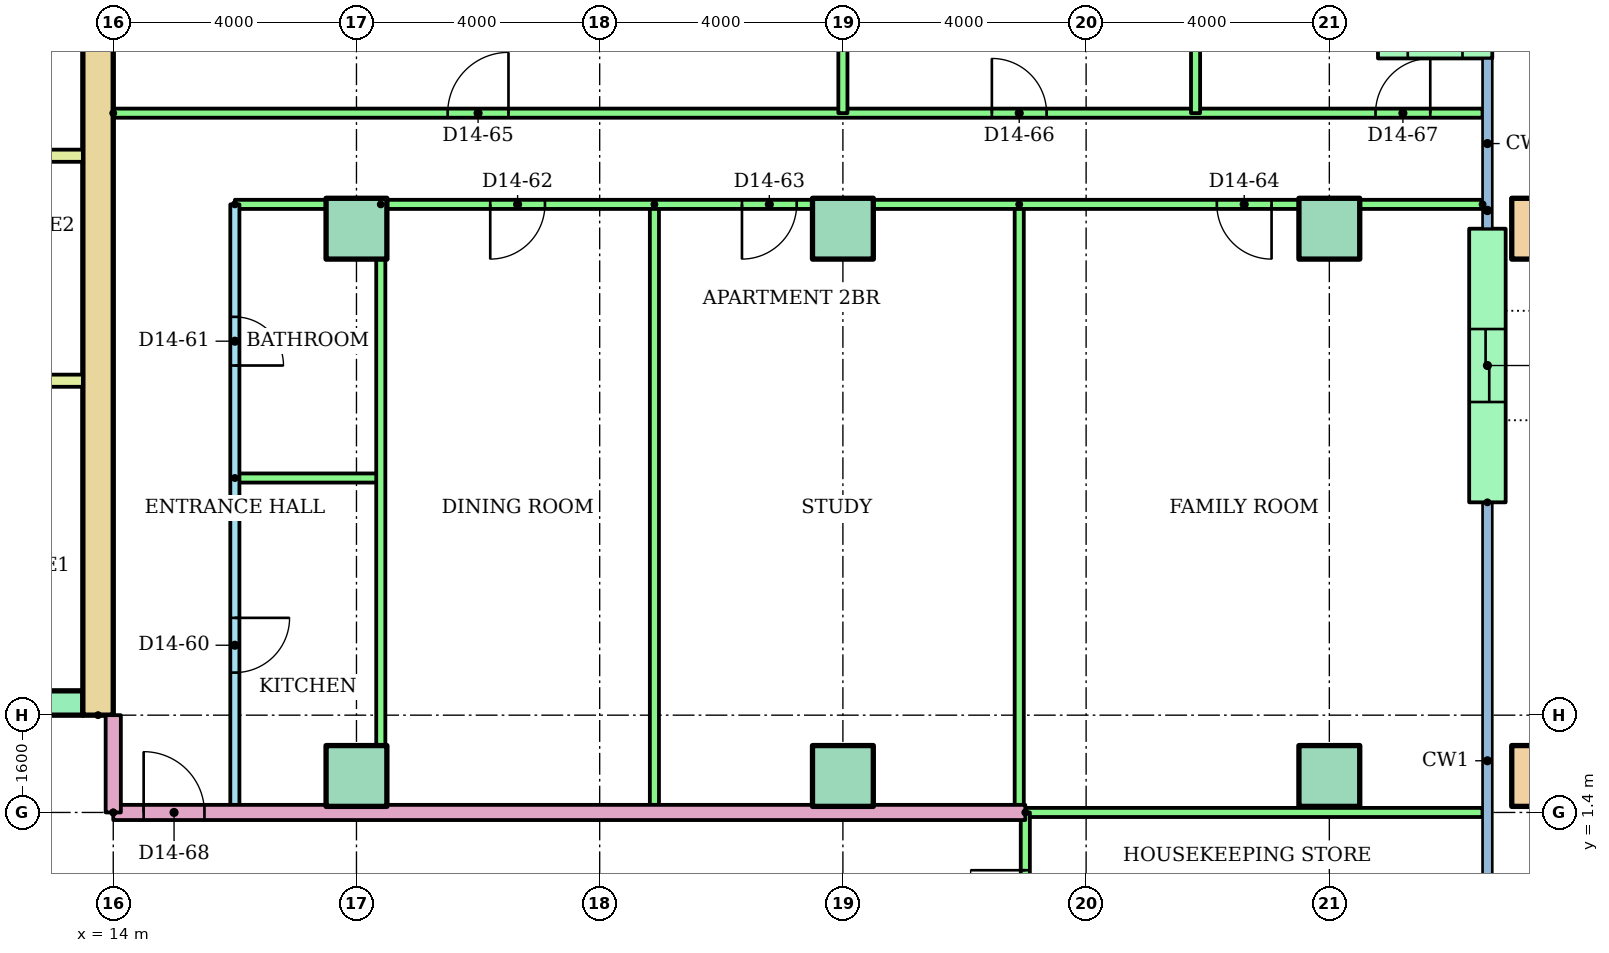
"""IFC4 building model, lengths in metres.
Left out: names, types, materials, properties, quantities, classifications, styles, units other than length and angle.
Written with IfcOpenShell. Run it as: python <this file> out.ifc"""

import sys

from ifc_helpers import new_model, si_unit, direction, frame, frame_2d, origin, origin_2d, place, context, subcontext, project, spatial, rectangle, hollow_rectangle, extrude, element, fill, save


model = new_model("IFC4")
c1 = context("Model", 3, precision=1e-05, world=origin(), true_north=direction((0.0, 1.0)))
c2 = subcontext(c1, "Body", "Model", "MODEL_VIEW")
j1 = project(units=[si_unit("LENGTHUNIT", "METRE"), si_unit("PLANEANGLEUNIT", "RADIAN")], contexts=[c1])
p1 = place(None, origin())
s1 = spatial("IfcSite", under=j1, at=p1, CompositionType="ELEMENT")
p2 = place(p1, origin())
s2 = spatial("IfcBuilding", under=s1, at=p2, CompositionType="ELEMENT")
p3 = place(p2, frame((0.0, 0.0, 54.4)))
s3 = spatial("IfcBuildingStorey", under=s2, at=p3, CompositionType="ELEMENT", Elevation=54.4)
for number, where in (
    (1, (18.0, 2.0, 0.0)),
    (2, (26.0, 2.0, 0.0)),
    (3, (34.0, 2.0, 0.0)),
):
    element("IfcColumn", number, at=place(p3, frame(where)), inside=s3, PredefinedType="COLUMN", context=c2, shape_type="SweptSolid", body=[
        extrude(rectangle(XDim=1.0, YDim=1.0, at=origin_2d()), origin(), (0.0, 0.0, 1.0), 3.2),
    ])
p4 = place(p3, frame((37.5, 2.0, 0.0)))
e4 = element("IfcColumn", 4, at=p4, inside=s3, PredefinedType="COLUMN", context=c2, shape_type="SweptSolid", body=[
    extrude(hollow_rectangle(XDim=1.0, YDim=1.0, WallThickness=0.05, at=origin_2d()), origin(), (0.0, 0.0, 1.0), 3.2),
])
for number, where in (
    (5, (18.0, 11.0, 0.0)),
    (6, (26.0, 11.0, 0.0)),
    (7, (34.0, 11.0, 0.0)),
):
    element("IfcColumn", number, at=place(p3, frame(where)), inside=s3, PredefinedType="COLUMN", context=c2, shape_type="SweptSolid", body=[
        extrude(rectangle(XDim=1.0, YDim=1.0, at=origin_2d()), origin(), (0.0, 0.0, 1.0), 3.2),
    ])
p5 = place(p3, frame((37.5, 11.0, 0.0)))
e8 = element("IfcColumn", 8, at=p5, inside=s3, PredefinedType="COLUMN", context=c2, shape_type="SweptSolid", body=[
    extrude(hollow_rectangle(XDim=1.0, YDim=1.0, WallThickness=0.05, at=origin_2d()), origin(), (0.0, 0.0, 1.0), 3.2),
])
p6 = place(p3, frame((36.68, 14.1, 0.0), z_axis=(0.0, 0.0, 1.0), x_axis=(-1.0, 0.0, 0.0)))
e9 = element("IfcWall", 9, at=p6, inside=s3, PredefinedType="STANDARD", context=c2, shape_type="SweptSolid", body=[
    extrude(rectangle(XDim=1.88, YDim=0.6, at=frame_2d((0.94, 0.0))), origin(), (0.0, 0.0, 1.0), 2.92),
])
p7 = place(p6, frame((0.49, 0.0, 0.9)))
e10 = element("IfcOpeningElement", 10, at=p7, cuts=e9, PredefinedType="OPENING", context=c2, shape_type="SweptSolid", body=[
    extrude(rectangle(XDim=0.9, YDim=1.5, at=frame_2d((0.45, 0.75))), frame((0.0, 0.31, 0.0), z_axis=(0.0, -1.0, 0.0), x_axis=(1.0, 0.0, 0.0)), (0.0, 0.0, 1.0), 0.62),
])
p8 = place(p3, frame((36.6, 6.5, 0.0), z_axis=(0.0, 0.0, 1.0), x_axis=(0.0, 1.0, 0.0)))
e11 = element("IfcWall", 11, at=p8, inside=s3, PredefinedType="STANDARD", context=c2, shape_type="SweptSolid", body=[
    extrude(rectangle(XDim=4.5, YDim=0.6, at=frame_2d((2.25, 0.0))), origin(), (0.0, 0.0, 1.0), 2.92),
])
p9 = place(p8, frame((1.65, 0.0, 0.0)))
e12 = element("IfcOpeningElement", 12, at=p9, cuts=e11, PredefinedType="OPENING", context=c2, shape_type="SweptSolid", body=[
    extrude(rectangle(XDim=1.2, YDim=2.1, at=frame_2d((0.6, 1.05))), frame((0.0, 0.31, 0.0), z_axis=(0.0, -1.0, 0.0), x_axis=(1.0, 0.0, 0.0)), (0.0, 0.0, 1.0), 0.62),
])
p10 = place(p3, frame((13.75, 3.0, 0.0), z_axis=(0.0, 0.0, 1.0), x_axis=(0.0, 1.0, 0.0)))
e13 = element("IfcWall", 13, at=p10, inside=s3, PredefinedType="SHEAR", context=c2, shape_type="SweptSolid", body=[
    extrude(rectangle(XDim=17.0, YDim=0.5, at=frame_2d((8.5, 0.0))), origin(), (0.0, 0.0, 1.0), 2.92),
])
p11 = place(p3, frame((-13.5, 3.2, 0.0)))
e14 = element("IfcWall", 14, at=p11, inside=s3, PredefinedType="SHEAR", context=c2, shape_type="SweptSolid", body=[
    extrude(rectangle(XDim=27.0, YDim=0.4, at=frame_2d((13.5, 0.0))), origin(), (0.0, 0.0, 1.0), 2.92),
])
p12 = place(p11, frame((6.861, 0.0, 0.0)))
e15 = element("IfcOpeningElement", 15, at=p12, cuts=e14, PredefinedType="OPENING", context=c2, shape_type="SweptSolid", body=[
    extrude(rectangle(XDim=1.1, YDim=2.1, at=frame_2d((0.55, 1.05))), frame((0.0, 0.21, 0.0), z_axis=(0.0, -1.0, 0.0), x_axis=(1.0, 0.0, 0.0)), (0.0, 0.0, 1.0), 0.42),
])
p13 = place(p11, frame((9.906, 0.0, 0.0)))
e16 = element("IfcOpeningElement", 16, at=p13, cuts=e14, PredefinedType="OPENING", context=c2, shape_type="SweptSolid", body=[
    extrude(rectangle(XDim=1.1, YDim=2.1, at=frame_2d((0.55, 1.05))), frame((0.0, 0.21, 0.0), z_axis=(0.0, -1.0, 0.0), x_axis=(1.0, 0.0, 0.0)), (0.0, 0.0, 1.0), 0.42),
])
p14 = place(p11, frame((15.994, 0.0, 0.0)))
e17 = element("IfcOpeningElement", 17, at=p14, cuts=e14, PredefinedType="OPENING", context=c2, shape_type="SweptSolid", body=[
    extrude(rectangle(XDim=1.1, YDim=2.1, at=frame_2d((0.55, 1.05))), frame((0.0, 0.21, 0.0), z_axis=(0.0, -1.0, 0.0), x_axis=(1.0, 0.0, 0.0)), (0.0, 0.0, 1.0), 0.42),
])
p15 = place(p11, frame((19.039, 0.0, 0.0)))
e18 = element("IfcOpeningElement", 18, at=p15, cuts=e14, PredefinedType="OPENING", context=c2, shape_type="SweptSolid", body=[
    extrude(rectangle(XDim=1.1, YDim=2.1, at=frame_2d((0.55, 1.05))), frame((0.0, 0.21, 0.0), z_axis=(0.0, -1.0, 0.0), x_axis=(1.0, 0.0, 0.0)), (0.0, 0.0, 1.0), 0.42),
])
p16 = place(p11, frame((12.6, 0.0, 0.0)))
e19 = element("IfcOpeningElement", 19, at=p16, cuts=e14, PredefinedType="OPENING", context=c2, shape_type="SweptSolid", body=[
    extrude(rectangle(XDim=1.8, YDim=2.1, at=frame_2d((0.9, 1.05))), frame((0.0, 0.21, 0.0), z_axis=(0.0, -1.0, 0.0), x_axis=(1.0, 0.0, 0.0)), (0.0, 0.0, 1.0), 0.42),
])
for number, where in (
    (20, (9.6, 8.5, 0.0)),
    (21, (9.6, 12.2, 0.0)),
):
    element("IfcWall", number, at=place(p3, frame(where)), inside=s3, PredefinedType="PARTITIONING", context=c2, shape_type="SweptSolid", body=[
        extrude(rectangle(XDim=3.9, YDim=0.2, at=frame_2d((1.95, 0.0))), origin(), (0.0, 0.0, 1.0), 2.92),
    ])
p17 = place(p3, frame((16.0, 11.4, 0.0), z_axis=(0.0, 0.0, 1.0), x_axis=(0.0, -1.0, 0.0)))
e22 = element("IfcWall", 22, at=p17, inside=s3, PredefinedType="PARTITIONING", context=c2, shape_type="SweptSolid", body=[
    extrude(rectangle(XDim=10.0, YDim=0.15, at=frame_2d((5.0, 0.0))), origin(), (0.0, 0.0, 1.0), 2.4),
])
p18 = place(p17, frame((6.8, 0.0, 0.0)))
e23 = element("IfcOpeningElement", 23, at=p18, cuts=e22, PredefinedType="OPENING", context=c2, shape_type="SweptSolid", body=[
    extrude(rectangle(XDim=0.9, YDim=2.1, at=frame_2d((0.45, 1.05))), frame((0.0, 0.085, 0.0), z_axis=(0.0, -1.0, 0.0), x_axis=(1.0, 0.0, 0.0)), (0.0, 0.0, 1.0), 0.17),
])
p19 = place(p17, frame((1.85, 0.0, 0.0)))
e24 = element("IfcOpeningElement", 24, at=p19, cuts=e22, PredefinedType="OPENING", context=c2, shape_type="SweptSolid", body=[
    extrude(rectangle(XDim=0.8, YDim=2.1, at=frame_2d((0.4, 1.05))), frame((0.0, 0.085, 0.0), z_axis=(0.0, -1.0, 0.0), x_axis=(1.0, 0.0, 0.0)), (0.0, 0.0, 1.0), 0.17),
])
p20 = place(p3, frame((16.0, 6.9, 0.0)))
e25 = element("IfcWall", 25, at=p20, inside=s3, PredefinedType="PARTITIONING", context=c2, shape_type="SweptSolid", body=[
    extrude(rectangle(XDim=2.4, YDim=0.15, at=frame_2d((1.2, 0.0))), origin(), (0.0, 0.0, 1.0), 2.4),
])
for number, where, z_axis, x_axis in (
    (26, (18.4, 11.4, 0.0), (0.0, 0.0, 1.0), (0.0, -1.0, 0.0)),
    (27, (22.9, 11.4, 0.0), (0.0, 0.0, 1.0), (0.0, -1.0, 0.0)),
    (28, (28.9, 11.4, 0.0), (0.0, 0.0, 1.0), (0.0, -1.0, 0.0)),
):
    element("IfcWall", number, at=place(p3, frame(where, z_axis=z_axis, x_axis=x_axis)), inside=s3, PredefinedType="PARTITIONING", context=c2, shape_type="SweptSolid", body=[
        extrude(rectangle(XDim=10.0, YDim=0.15, at=frame_2d((5.0, 0.0))), origin(), (0.0, 0.0, 1.0), 2.4),
    ])
p21 = place(p3, frame((36.52, 11.4, 0.0), z_axis=(0.0, 0.0, 1.0), x_axis=(-1.0, 0.0, 0.0)))
e29 = element("IfcWall", 29, at=p21, inside=s3, PredefinedType="PARTITIONING", context=c2, shape_type="SweptSolid", body=[
    extrude(rectangle(XDim=20.52, YDim=0.15, at=frame_2d((10.26, 0.0))), origin(), (0.0, 0.0, 1.0), 2.4),
])
p22 = place(p21, frame((15.42, 0.0, 0.0)))
e30 = element("IfcOpeningElement", 30, at=p22, cuts=e29, PredefinedType="OPENING", context=c2, shape_type="SweptSolid", body=[
    extrude(rectangle(XDim=0.9, YDim=2.1, at=frame_2d((0.45, 1.05))), frame((0.0, 0.085, 0.0), z_axis=(0.0, -1.0, 0.0), x_axis=(1.0, 0.0, 0.0)), (0.0, 0.0, 1.0), 0.17),
])
p23 = place(p21, frame((11.28, 0.0, 0.0)))
e31 = element("IfcOpeningElement", 31, at=p23, cuts=e29, PredefinedType="OPENING", context=c2, shape_type="SweptSolid", body=[
    extrude(rectangle(XDim=0.9, YDim=2.1, at=frame_2d((0.45, 1.05))), frame((0.0, 0.085, 0.0), z_axis=(0.0, -1.0, 0.0), x_axis=(1.0, 0.0, 0.0)), (0.0, 0.0, 1.0), 0.17),
])
p24 = place(p21, frame((3.47, 0.0, 0.0)))
e32 = element("IfcOpeningElement", 32, at=p24, cuts=e29, PredefinedType="OPENING", context=c2, shape_type="SweptSolid", body=[
    extrude(rectangle(XDim=0.9, YDim=2.1, at=frame_2d((0.45, 1.05))), frame((0.0, 0.085, 0.0), z_axis=(0.0, -1.0, 0.0), x_axis=(1.0, 0.0, 0.0)), (0.0, 0.0, 1.0), 0.17),
])
p25 = place(p3, frame((14.0, 12.9, 0.0)))
e33 = element("IfcWall", 33, at=p25, inside=s3, PredefinedType="PARTITIONING", context=c2, shape_type="SweptSolid", body=[
    extrude(rectangle(XDim=22.52, YDim=0.15, at=frame_2d((11.26, 0.0))), origin(), (0.0, 0.0, 1.0), 2.4),
])
p26 = place(p25, frame((5.5, 0.0, 0.0)))
e34 = element("IfcOpeningElement", 34, at=p26, cuts=e33, PredefinedType="OPENING", context=c2, shape_type="SweptSolid", body=[
    extrude(rectangle(XDim=1.0, YDim=2.1, at=frame_2d((0.5, 1.05))), frame((0.0, 0.085, 0.0), z_axis=(0.0, -1.0, 0.0), x_axis=(1.0, 0.0, 0.0)), (0.0, 0.0, 1.0), 0.17),
])
p27 = place(p25, frame((14.45, 0.0, 0.0)))
e35 = element("IfcOpeningElement", 35, at=p27, cuts=e33, PredefinedType="OPENING", context=c2, shape_type="SweptSolid", body=[
    extrude(rectangle(XDim=0.9, YDim=2.1, at=frame_2d((0.45, 1.05))), frame((0.0, 0.085, 0.0), z_axis=(0.0, -1.0, 0.0), x_axis=(1.0, 0.0, 0.0)), (0.0, 0.0, 1.0), 0.17),
])
p28 = place(p25, frame((20.76, 0.0, 0.0)))
e36 = element("IfcOpeningElement", 36, at=p28, cuts=e33, PredefinedType="OPENING", context=c2, shape_type="SweptSolid", body=[
    extrude(rectangle(XDim=0.9, YDim=2.1, at=frame_2d((0.45, 1.05))), frame((0.0, 0.085, 0.0), z_axis=(0.0, -1.0, 0.0), x_axis=(1.0, 0.0, 0.0)), (0.0, 0.0, 1.0), 0.17),
])
p29 = place(p3, frame((26.0, 18.521, 0.0), z_axis=(0.0, 0.0, 1.0), x_axis=(0.0, -1.0, 0.0)))
e37 = element("IfcWall", 37, at=p29, inside=s3, PredefinedType="PARTITIONING", context=c2, shape_type="SweptSolid", body=[
    extrude(rectangle(XDim=5.621, YDim=0.15, at=frame_2d((2.811, 0.0))), origin(), (0.0, 0.0, 1.0), 2.4),
])
p30 = place(p3, frame((31.8, 16.72, 0.0), z_axis=(0.0, 0.0, 1.0), x_axis=(0.0, -1.0, 0.0)))
e38 = element("IfcWall", 38, at=p30, inside=s3, PredefinedType="PARTITIONING", context=c2, shape_type="SweptSolid", body=[
    extrude(rectangle(XDim=3.82, YDim=0.15, at=frame_2d((1.91, 0.0))), origin(), (0.0, 0.0, 1.0), 2.4),
])
p31 = place(p3, frame((14.0, 1.4, 0.0)))
e39 = element("IfcWall", 39, at=p31, inside=s3, PredefinedType="PARTITIONING", context=c2, shape_type="SweptSolid", body=[
    extrude(rectangle(XDim=15.0, YDim=0.25, at=frame_2d((7.5, 0.0))), origin(), (0.0, 0.0, 1.0), 2.4),
])
p32 = place(p31, frame((0.5, 0.0, 0.0)))
e40 = element("IfcOpeningElement", 40, at=p32, cuts=e39, PredefinedType="OPENING", context=c2, shape_type="SweptSolid", body=[
    extrude(rectangle(XDim=1.0, YDim=2.1, at=frame_2d((0.5, 1.05))), frame((0.0, 0.135, 0.0), z_axis=(0.0, -1.0, 0.0), x_axis=(1.0, 0.0, 0.0)), (0.0, 0.0, 1.0), 0.27),
])
p33 = place(p3, frame((29.0, 1.4, 0.0)))
e41 = element("IfcWall", 41, at=p33, inside=s3, PredefinedType="PARTITIONING", context=c2, shape_type="SweptSolid", body=[
    extrude(rectangle(XDim=7.52, YDim=0.15, at=frame_2d((3.76, 0.0))), origin(), (0.0, 0.0, 1.0), 2.4),
])
p34 = place(p3, frame((29.0, -1.4, 0.0), z_axis=(0.0, 0.0, 1.0), x_axis=(0.0, 1.0, 0.0)))
e42 = element("IfcWall", 42, at=p34, inside=s3, PredefinedType="PARTITIONING", context=c2, shape_type="SweptSolid", body=[
    extrude(rectangle(XDim=2.8, YDim=0.15, at=frame_2d((1.4, 0.0))), origin(), (0.0, 0.0, 1.0), 2.4),
])
p35 = place(p34, frame((0.95, 0.0, 0.0)))
e43 = element("IfcOpeningElement", 43, at=p35, cuts=e42, PredefinedType="OPENING", context=c2, shape_type="SweptSolid", body=[
    extrude(rectangle(XDim=0.9, YDim=2.1, at=frame_2d((0.45, 1.05))), frame((0.0, 0.085, 0.0), z_axis=(0.0, -1.0, 0.0), x_axis=(1.0, 0.0, 0.0)), (0.0, 0.0, 1.0), 0.17),
])
p36 = place(p3, frame((14.0, 1.4, 0.0), z_axis=(0.0, 0.0, 1.0), x_axis=(0.0, 1.0, 0.0)))
e44 = element("IfcWall", 44, at=p36, inside=s3, PredefinedType="PARTITIONING", context=c2, shape_type="SweptSolid", body=[
    extrude(rectangle(XDim=1.6, YDim=0.25, at=frame_2d((0.8, 0.0))), origin(), (0.0, 0.0, 1.0), 2.4),
])
p37 = place(p18, origin())
e45 = element("IfcDoor", 45, at=p37, inside=s3, OperationType="SINGLE_SWING_LEFT", PredefinedType="DOOR", context=c2, shape_type="SweptSolid", body=[
    extrude(rectangle(XDim=0.9, YDim=2.1, at=frame_2d((0.45, 1.05))), frame((0.0, 0.025, 0.0), z_axis=(0.0, -1.0, 0.0), x_axis=(1.0, 0.0, 0.0)), (0.0, 0.0, 1.0), 0.05),
])
fill(e23, e45)
p38 = place(p19, origin())
e46 = element("IfcDoor", 46, at=p38, inside=s3, OperationType="SINGLE_SWING_RIGHT", PredefinedType="DOOR", context=c2, shape_type="SweptSolid", body=[
    extrude(rectangle(XDim=0.8, YDim=2.1, at=frame_2d((0.4, 1.05))), frame((0.0, 0.025, 0.0), z_axis=(0.0, -1.0, 0.0), x_axis=(1.0, 0.0, 0.0)), (0.0, 0.0, 1.0), 0.05),
])
fill(e24, e46)
p39 = place(p22, origin())
e47 = element("IfcDoor", 47, at=p39, inside=s3, OperationType="SINGLE_SWING_RIGHT", PredefinedType="DOOR", context=c2, shape_type="SweptSolid", body=[
    extrude(rectangle(XDim=0.9, YDim=2.1, at=frame_2d((0.45, 1.05))), frame((0.0, 0.025, 0.0), z_axis=(0.0, -1.0, 0.0), x_axis=(1.0, 0.0, 0.0)), (0.0, 0.0, 1.0), 0.05),
])
fill(e30, e47)
p40 = place(p23, origin())
e48 = element("IfcDoor", 48, at=p40, inside=s3, OperationType="SINGLE_SWING_RIGHT", PredefinedType="DOOR", context=c2, shape_type="SweptSolid", body=[
    extrude(rectangle(XDim=0.9, YDim=2.1, at=frame_2d((0.45, 1.05))), frame((0.0, 0.025, 0.0), z_axis=(0.0, -1.0, 0.0), x_axis=(1.0, 0.0, 0.0)), (0.0, 0.0, 1.0), 0.05),
])
fill(e31, e48)
p41 = place(p24, origin())
e49 = element("IfcDoor", 49, at=p41, inside=s3, OperationType="SINGLE_SWING_LEFT", PredefinedType="DOOR", context=c2, shape_type="SweptSolid", body=[
    extrude(rectangle(XDim=0.9, YDim=2.1, at=frame_2d((0.45, 1.05))), frame((0.0, 0.025, 0.0), z_axis=(0.0, -1.0, 0.0), x_axis=(1.0, 0.0, 0.0)), (0.0, 0.0, 1.0), 0.05),
])
fill(e32, e49)
p42 = place(p26, origin())
e50 = element("IfcDoor", 50, at=p42, inside=s3, OperationType="SINGLE_SWING_RIGHT", PredefinedType="DOOR", context=c2, shape_type="SweptSolid", body=[
    extrude(rectangle(XDim=1.0, YDim=2.1, at=frame_2d((0.5, 1.05))), frame((0.0, 0.025, 0.0), z_axis=(0.0, -1.0, 0.0), x_axis=(1.0, 0.0, 0.0)), (0.0, 0.0, 1.0), 0.05),
])
fill(e34, e50)
p43 = place(p27, origin())
e51 = element("IfcDoor", 51, at=p43, inside=s3, OperationType="SINGLE_SWING_LEFT", PredefinedType="DOOR", context=c2, shape_type="SweptSolid", body=[
    extrude(rectangle(XDim=0.9, YDim=2.1, at=frame_2d((0.45, 1.05))), frame((0.0, 0.025, 0.0), z_axis=(0.0, -1.0, 0.0), x_axis=(1.0, 0.0, 0.0)), (0.0, 0.0, 1.0), 0.05),
])
fill(e35, e51)
p44 = place(p28, origin())
e52 = element("IfcDoor", 52, at=p44, inside=s3, OperationType="SINGLE_SWING_RIGHT", PredefinedType="DOOR", context=c2, shape_type="SweptSolid", body=[
    extrude(rectangle(XDim=0.9, YDim=2.1, at=frame_2d((0.45, 1.05))), frame((0.0, 0.025, 0.0), z_axis=(0.0, -1.0, 0.0), x_axis=(1.0, 0.0, 0.0)), (0.0, 0.0, 1.0), 0.05),
])
fill(e36, e52)
p45 = place(p32, origin())
e53 = element("IfcDoor", 53, at=p45, inside=s3, OperationType="SINGLE_SWING_LEFT", PredefinedType="DOOR", context=c2, shape_type="SweptSolid", body=[
    extrude(rectangle(XDim=1.0, YDim=2.1, at=frame_2d((0.5, 1.05))), frame((0.0, 0.025, 0.0), z_axis=(0.0, -1.0, 0.0), x_axis=(1.0, 0.0, 0.0)), (0.0, 0.0, 1.0), 0.05),
])
fill(e40, e53)
p46 = place(p35, origin())
e54 = element("IfcDoor", 54, at=p46, inside=s3, OperationType="SINGLE_SWING_RIGHT", PredefinedType="DOOR", context=c2, shape_type="SweptSolid", body=[
    extrude(rectangle(XDim=0.9, YDim=2.1, at=frame_2d((0.45, 1.05))), frame((0.0, 0.025, 0.0), z_axis=(0.0, -1.0, 0.0), x_axis=(1.0, 0.0, 0.0)), (0.0, 0.0, 1.0), 0.05),
])
fill(e43, e54)
p47 = place(p9, origin())
e55 = element("IfcDoor", 55, at=p47, inside=s3, OperationType="SLIDING_TO_LEFT", PredefinedType="DOOR", context=c2, shape_type="SweptSolid", body=[
    extrude(rectangle(XDim=1.2, YDim=2.1, at=frame_2d((0.6, 1.05))), frame((0.0, 0.025, 0.0), z_axis=(0.0, -1.0, 0.0), x_axis=(1.0, 0.0, 0.0)), (0.0, 0.0, 1.0), 0.05),
])
fill(e12, e55)
save(model, sys.argv[1])
